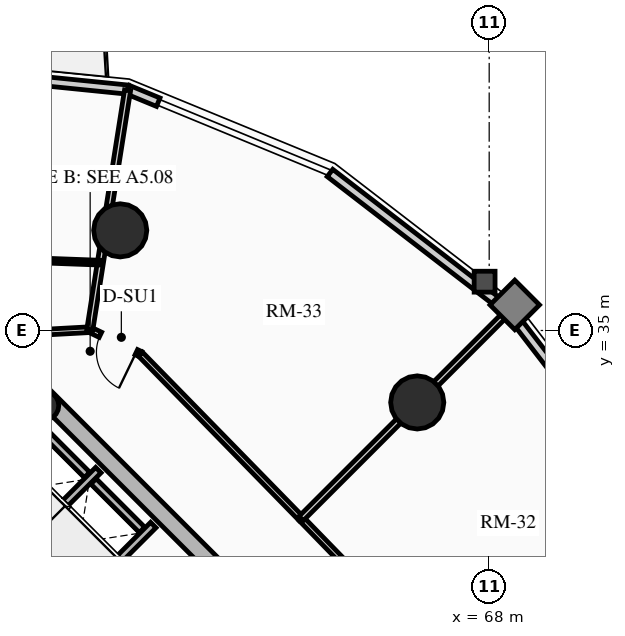
"""IFC4 building model, lengths in metres.
Left out: names, types, materials, properties, quantities, classifications, styles, units other than length and angle.
Written with IfcOpenShell. Run it as: python <this file> out.ifc"""

import sys

from ifc_helpers import new_model, si_unit, direction, frame, frame_2d, origin, origin_2d, place, context, subcontext, project, spatial, rectangle, circle, hollow_circle, extrude, source, transform, mapped, element, fill, save


model = new_model("IFC4")
c1 = context("Model", 3, precision=1e-05, world=origin(), true_north=direction((0.0, 1.0)))
c2 = subcontext(c1, "Body", "Model", "MODEL_VIEW")
j1 = project(units=[si_unit("LENGTHUNIT", "METRE"), si_unit("PLANEANGLEUNIT", "RADIAN")], contexts=[c1])
p1 = place(None, origin())
s1 = spatial("IfcSite", under=j1, at=p1, CompositionType="ELEMENT")
p2 = place(p1, origin())
s2 = spatial("IfcBuilding", under=s1, at=p2, CompositionType="ELEMENT")
p3 = place(p2, frame((0.0, 0.0, 93.43)))
s3 = spatial("IfcBuildingStorey", under=s2, at=p3, CompositionType="ELEMENT", Elevation=93.43)
p4 = place(p3, frame((66.303, 23.263, 0.0), z_axis=(0.0, 0.0, 1.0), x_axis=(-0.707106781187, 0.707106781187, 0.0)))
e1 = element("IfcWall", 1, at=p4, inside=s3, PredefinedType="SHEAR", context=c2, shape_type="SweptSolid", body=[
    extrude(rectangle(XDim=14.2, YDim=0.45, at=frame_2d((7.1, 0.0))), origin(), (0.0, 0.0, 1.0), 2.91),
])
p5 = place(p3, frame((48.856, 25.578, 0.0), z_axis=(0.0, 0.0, 1.0), x_axis=(0.707106781187, 0.707106781187, 0.0)))
e2 = element("IfcWall", 2, at=p5, inside=s3, PredefinedType="SHEAR", context=c2, shape_type="SweptSolid", body=[
    extrude(rectangle(XDim=10.7, YDim=0.45, at=frame_2d((5.35, 0.0))), origin(), (0.0, 0.0, 1.0), 2.91),
])
m1 = source(origin(), c2, "Body", "SweptSolid", [
    extrude(rectangle(XDim=1.5, YDim=2.02, at=frame_2d((0.75, 1.01))), frame((0.0, 0.235, 0.0), z_axis=(0.0, -1.0, 0.0), x_axis=(1.0, 0.0, 0.0)), (0.0, 0.0, 1.0), 0.47),
])
p6 = place(p5, frame((4.6, 0.0, 0.0)))
e3 = element("IfcOpeningElement", 3, at=p6, cuts=e2, PredefinedType="OPENING", context=c2, shape_type="MappedRepresentation", body=[
    mapped(m1, transform((0.0, 0.0, 0.0), x_axis=(1.0, 0.0, 0.0), y_axis=(0.0, 1.0, 0.0), z_axis=(0.0, 0.0, 1.0), scale=1.0)),
])
p7 = place(p3, frame((63.645, 20.922, 0.0), z_axis=(0.0, 0.0, 1.0), x_axis=(-0.707106781187, 0.707106781187, 0.0)))
e4 = element("IfcWall", 4, at=p7, inside=s3, PredefinedType="SHEAR", context=c2, shape_type="SweptSolid", body=[
    extrude(rectangle(XDim=13.75, YDim=0.35, at=frame_2d((6.875, 0.0))), origin(), (0.0, 0.0, 1.0), 2.91),
])
m2 = source(origin(), c2, "Body", "SweptSolid", [
    extrude(rectangle(XDim=1.1, YDim=2.015, at=frame_2d((0.55, 1.007))), frame((0.0, 0.185, 0.0), z_axis=(0.0, -1.0, 0.0), x_axis=(1.0, 0.0, 0.0)), (0.0, 0.0, 1.0), 0.37),
])
p8 = place(p7, frame((10.0, 0.0, 0.0)))
e5 = element("IfcOpeningElement", 5, at=p8, cuts=e4, PredefinedType="OPENING", context=c2, shape_type="MappedRepresentation", body=[
    mapped(m2, transform((0.0, 0.0, 0.0), x_axis=(1.0, 0.0, 0.0), y_axis=(0.0, 1.0, 0.0), z_axis=(0.0, 0.0, 1.0), scale=1.0)),
])
p9 = place(p7, frame((12.0, 0.0, 0.0)))
e6 = element("IfcOpeningElement", 6, at=p9, cuts=e4, PredefinedType="OPENING", context=c2, shape_type="MappedRepresentation", body=[
    mapped(m2, transform((0.0, 0.0, 0.0), x_axis=(1.0, 0.0, 0.0), y_axis=(0.0, 1.0, 0.0), z_axis=(0.0, 0.0, 1.0), scale=1.0)),
])
m3 = source(origin(), c2, "Body", "SweptSolid", [
    extrude(rectangle(XDim=1.15, YDim=2.02, at=frame_2d((0.575, 1.01))), frame((0.0, 0.185, 0.0), z_axis=(0.0, -1.0, 0.0), x_axis=(1.0, 0.0, 0.0)), (0.0, 0.0, 1.0), 0.37),
])
p10 = place(p7, frame((5.305, 0.0, 0.0)))
e7 = element("IfcOpeningElement", 7, at=p10, cuts=e4, PredefinedType="OPENING", context=c2, shape_type="MappedRepresentation", body=[
    mapped(m3, transform((0.0, 0.0, 0.0), x_axis=(1.0, 0.0, 0.0), y_axis=(0.0, 1.0, 0.0), z_axis=(0.0, 0.0, 1.0), scale=1.0)),
])
p11 = place(p3, frame((56.294, 33.024, 0.0), z_axis=(0.0, 0.0, 1.0), x_axis=(0.707106781187, 0.707106781187, 0.0)))
e8 = element("IfcColumn", 8, at=p11, inside=s3, PredefinedType="COLUMN", context=c2, shape_type="SweptSolid", body=[
    extrude(hollow_circle(Radius=0.38, WallThickness=0.032, at=origin_2d()), origin(), (0.0, 0.0, 1.0), 2.91),
])
for number, where, z_axis, x_axis in (
    (9, (66.107, 33.107, 0.0), (0.0, 0.0, 1.0), (1.0, 0.0, 0.0)),
    (10, (58.291, 37.635, 0.0), (0.0, 0.0, 1.0), (1.0, 0.0, 0.0)),
):
    element("IfcColumn", number, at=place(p3, frame(where, z_axis=z_axis, x_axis=x_axis)), inside=s3, PredefinedType="USERDEFINED", context=c2, shape_type="SweptSolid", body=[
        extrude(circle(Radius=0.7, at=origin_2d()), origin(), (0.0, 0.0, 1.0), 2.91),
    ])
p12 = place(p3, frame((63.811, 39.145, 0.0), z_axis=(0.0, 0.0, 1.0), x_axis=(0.791982052206, -0.61054437102, 0.0)))
e11 = element("IfcWall", 11, at=p12, inside=s3, PredefinedType="SOLIDWALL", context=c2, shape_type="SweptSolid", body=[
    extrude(rectangle(XDim=5.942, YDim=0.24, at=frame_2d((2.971, 0.0))), origin(), (0.0, 0.0, 1.0), 2.179),
])
p13 = place(p3, frame((58.487, 41.339, 0.0), z_axis=(0.0, 0.0, 1.0), x_axis=(0.924556017656, -0.381046152345, 0.0)))
e12 = element("IfcWall", 12, at=p13, inside=s3, PredefinedType="SOLIDWALL", context=c2, shape_type="SweptSolid", body=[
    extrude(rectangle(XDim=0.87, YDim=0.24, at=frame_2d((0.435, 0.0))), origin(), (0.0, 0.0, 1.0), 2.179),
])
p14 = place(p3, frame((53.067, 41.885, 0.0), z_axis=(0.0, 0.0, 1.0), x_axis=(0.994971754311, -0.10015591906, 0.0)))
e13 = element("IfcWall", 13, at=p14, inside=s3, PredefinedType="SOLIDWALL", context=c2, shape_type="SweptSolid", body=[
    extrude(rectangle(XDim=5.448, YDim=0.24, at=frame_2d((2.724, 0.0))), origin(), (0.0, 0.0, 1.0), 2.179),
])
m4 = source(origin(), c2, "Body", "SweptSolid", [
    extrude(rectangle(XDim=1.15, YDim=2.005, at=frame_2d((0.575, 1.002))), frame((0.0, 0.13, 0.0), z_axis=(0.0, -1.0, 0.0), x_axis=(1.0, 0.0, 0.0)), (0.0, 0.0, 1.0), 0.26),
])
p15 = place(p14, frame((2.149, 0.0, 0.0)))
e14 = element("IfcOpeningElement", 14, at=p15, cuts=e13, PredefinedType="OPENING", context=c2, shape_type="MappedRepresentation", body=[
    mapped(m4, transform((0.0, 0.0, 0.0), x_axis=(1.0, 0.0, 0.0), y_axis=(0.0, 1.0, 0.0), z_axis=(0.0, 0.0, 1.0), scale=1.0)),
])
p16 = place(p3, frame((68.517, 35.517, 0.0), z_axis=(0.0, 0.0, 1.0), x_axis=(0.61054437102, -0.791982052206, 0.0)))
e15 = element("IfcWall", 15, at=p16, inside=s3, PredefinedType="SOLIDWALL", context=c2, shape_type="SweptSolid", body=[
    extrude(rectangle(XDim=5.942, YDim=0.24, at=frame_2d((2.971, 0.0))), origin(), (0.0, 0.0, 1.0), 2.179),
])
m5 = source(origin(), c2, "Body", "SweptSolid", [
    extrude(rectangle(XDim=2.2, YDim=1.35, at=frame_2d((1.1, 0.675))), frame((0.0, 0.13, 0.0), z_axis=(0.0, -1.0, 0.0), x_axis=(1.0, 0.0, 0.0)), (0.0, 0.0, 1.0), 0.26),
])
p17 = place(p16, frame((1.871, 0.0, 0.65)))
e16 = element("IfcOpeningElement", 16, at=p17, cuts=e15, PredefinedType="OPENING", context=c2, shape_type="MappedRepresentation", body=[
    mapped(m5, transform((0.0, 0.0, 0.0), x_axis=(1.0, 0.0, 0.0), y_axis=(0.0, 1.0, 0.0), z_axis=(0.0, 0.0, 1.0), scale=1.0)),
])
p18 = place(p3, frame((57.062, 27.781, 0.0), z_axis=(0.0, 0.0, 1.0), x_axis=(0.707106781187, 0.707106781187, 0.0)))
e17 = element("IfcWall", 17, at=p18, inside=s3, PredefinedType="SHEAR", context=c2, shape_type="SweptSolid", body=[
    extrude(rectangle(XDim=2.97, YDim=0.2, at=frame_2d((1.485, 0.0))), origin(), (0.0, 0.0, 1.0), 2.91),
])
p19 = place(p3, frame((55.615, 29.227, 0.0), z_axis=(0.0, 0.0, 1.0), x_axis=(0.707147878904, 0.70706568108, 0.0)))
e18 = element("IfcWall", 18, at=p19, inside=s3, PredefinedType="SHEAR", context=c2, shape_type="SweptSolid", body=[
    extrude(rectangle(XDim=2.97, YDim=0.2, at=frame_2d((1.485, 0.0))), origin(), (0.0, 0.0, 1.0), 2.91),
])
p20 = place(p3, frame((58.865, 29.754, 0.0), z_axis=(0.0, 0.0, 1.0), x_axis=(-0.707174411312, 0.707039144592, 0.0)))
e19 = element("IfcWall", 19, at=p20, inside=s3, PredefinedType="SHEAR", context=c2, shape_type="SweptSolid", body=[
    extrude(rectangle(XDim=1.805, YDim=0.2, at=frame_2d((0.902, 0.0))), origin(), (0.0, 0.0, 1.0), 2.91),
])
p21 = place(p3, frame((57.419, 31.2, 0.0), z_axis=(0.0, 0.0, 1.0), x_axis=(-0.707032117043, 0.707181437447, 0.0)))
e20 = element("IfcWall", 20, at=p21, inside=s3, PredefinedType="SHEAR", context=c2, shape_type="SweptSolid", body=[
    extrude(rectangle(XDim=1.635, YDim=0.2, at=frame_2d((0.817, 0.0))), origin(), (0.0, 0.0, 1.0), 2.91),
])
p22 = place(p3, frame((63.051, 30.051, 0.0), z_axis=(0.0, 0.0, 1.0), x_axis=(-0.698846622234, 0.715271555839, 0.0)))
e21 = element("IfcWall", 21, at=p22, inside=s3, PredefinedType="PARTITIONING", context=c2, shape_type="SweptSolid", body=[
    extrude(rectangle(XDim=6.05, YDim=0.15, at=frame_2d((3.025, 0.0))), origin(), (0.0, 0.0, 1.0), 2.225),
])
p23 = place(p3, frame((58.823, 34.378, 0.0), z_axis=(0.0, 0.0, 1.0), x_axis=(-0.900449137666, 0.434961320668, 0.0)))
e22 = element("IfcWall", 22, at=p23, inside=s3, PredefinedType="PARTITIONING", context=c2, shape_type="SweptSolid", body=[
    extrude(rectangle(XDim=1.479, YDim=0.15, at=frame_2d((0.74, 0.0))), origin(), (0.0, 0.0, 1.0), 2.225),
])
m6 = source(origin(), c2, "Body", "SweptSolid", [
    extrude(rectangle(XDim=1.05, YDim=2.015, at=frame_2d((0.525, 1.007))), frame((0.0, 0.085, 0.0), z_axis=(0.0, -1.0, 0.0), x_axis=(1.0, 0.0, 0.0)), (0.0, 0.0, 1.0), 0.17),
])
p24 = place(p23, frame((0.12, 0.0, 0.0)))
e23 = element("IfcOpeningElement", 23, at=p24, cuts=e22, PredefinedType="OPENING", context=c2, shape_type="MappedRepresentation", body=[
    mapped(m6, transform((0.0, 0.0, 0.0), x_axis=(1.0, 0.0, 0.0), y_axis=(0.0, 1.0, 0.0), z_axis=(0.0, 0.0, 1.0), scale=1.0)),
])
p25 = place(p3, frame((57.491, 35.021, 0.0), z_axis=(0.0, 0.0, 1.0), x_axis=(-0.9985194771, -0.054395347698, 0.0)))
e24 = element("IfcWall", 24, at=p25, inside=s3, PredefinedType="PARTITIONING", context=c2, shape_type="SweptSolid", body=[
    extrude(rectangle(XDim=1.472, YDim=0.15, at=frame_2d((0.736, 0.0))), origin(), (0.0, 0.0, 1.0), 2.225),
])
p26 = place(p3, frame((67.19, 25.791, 0.0), z_axis=(0.0, 0.0, 1.0), x_axis=(-0.696839457851, 0.717227139742, 0.0)))
e25 = element("IfcWall", 25, at=p26, inside=s3, PredefinedType="PARTITIONING", context=c2, shape_type="SweptSolid", body=[
    extrude(rectangle(XDim=5.939, YDim=0.15, at=frame_2d((2.97, 0.0))), origin(), (0.0, 0.0, 1.0), 2.655),
])
p27 = place(p3, frame((63.051, 30.051, 0.0), z_axis=(0.0, 0.0, 1.0), x_axis=(0.707106781187, 0.707106781187, 0.0)))
e26 = element("IfcWall", 26, at=p27, inside=s3, PredefinedType="PARTITIONING", context=c2, shape_type="SweptSolid", body=[
    extrude(rectangle(XDim=7.711, YDim=0.16, at=frame_2d((3.855, 0.0))), origin(), (0.0, 0.0, 1.0), 2.179),
])
p28 = place(p3, frame((57.491, 35.021, 0.0), z_axis=(0.0, 0.0, 1.0), x_axis=(0.155805268746, 0.98778779008, 0.0)))
e27 = element("IfcWall", 27, at=p28, inside=s3, PredefinedType="PARTITIONING", context=c2, shape_type="SweptSolid", body=[
    extrude(rectangle(XDim=6.376, YDim=0.16, at=frame_2d((3.188, 0.0))), origin(), (0.0, 0.0, 1.0), 2.179),
])
p29 = place(p3, frame((57.769, 36.785, 0.0), z_axis=(0.0, 0.0, 1.0), x_axis=(-0.999316779648, 0.036959084311, 0.0)))
e28 = element("IfcWall", 28, at=p29, inside=s3, PredefinedType="PARTITIONING", context=c2, shape_type="SweptSolid", body=[
    extrude(rectangle(XDim=2.576, YDim=0.125, at=frame_2d((1.288, 0.0))), origin(), (0.0, 0.0, 1.0), 2.655),
])
m7 = source(origin(), c2, "Body", "SweptSolid", [
    extrude(rectangle(XDim=1.05, YDim=2.015, at=frame_2d((0.525, 1.007))), frame((0.0, 0.025, 0.0), z_axis=(0.0, -1.0, 0.0), x_axis=(1.0, 0.0, 0.0)), (0.0, 0.0, 1.0), 0.05),
])
p30 = place(p24, origin())
e29 = element("IfcDoor", 29, at=p30, inside=s3, OperationType="SINGLE_SWING_LEFT", PredefinedType="DOOR", context=c2, shape_type="MappedRepresentation", body=[
    mapped(m7, transform((0.0, 0.0, 0.0), x_axis=(1.0, 0.0, 0.0), y_axis=(0.0, 1.0, 0.0), z_axis=(0.0, 0.0, 1.0), scale=1.0)),
])
fill(e23, e29)
save(model, sys.argv[1])
